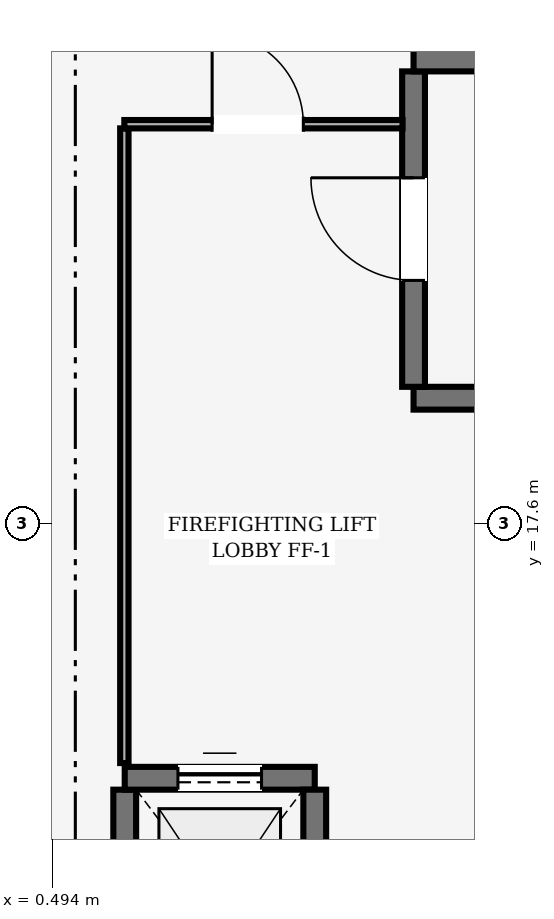
"""IFC4 building model, lengths in metres.
Left out: names, types, materials, properties, quantities, classifications, styles, units other than length and angle.
Written with IfcOpenShell. Run it as: python <this file> out.ifc"""

import sys

from ifc_helpers import new_model, si_unit, direction, frame, frame_2d, origin, place, context, subcontext, project, spatial, rectangle, extrude, element, fill, save


model = new_model("IFC4")
c1 = context("Model", 3, precision=1e-05, world=origin(), true_north=direction((0.0, 1.0)))
c2 = subcontext(c1, "Body", "Model", "MODEL_VIEW")
j1 = project(units=[si_unit("LENGTHUNIT", "METRE"), si_unit("PLANEANGLEUNIT", "RADIAN")], contexts=[c1])
p1 = place(None, origin())
s1 = spatial("IfcSite", under=j1, at=p1, CompositionType="ELEMENT")
p2 = place(p1, origin())
s2 = spatial("IfcBuilding", under=s1, at=p2, CompositionType="ELEMENT")
p3 = place(p2, frame((0.0, 0.0, 19.05)))
s3 = spatial("IfcBuildingStorey", under=s2, at=p3, CompositionType="ELEMENT", Elevation=19.05)
p4 = place(p3, frame((15.43, 19.25, 0.0), z_axis=(0.0, 0.0, 1.0), x_axis=(-1.0, 0.0, 0.0)))
e1 = element("IfcWall", 1, at=p4, inside=s3, PredefinedType="SHEAR", context=c2, shape_type="SweptSolid", body=[
    extrude(rectangle(XDim=10.18, YDim=0.3, at=frame_2d((5.09, 0.0))), origin(), (0.0, 0.0, 1.0), 3.06),
])
p5 = place(p3, frame((5.25, 19.4, 0.0), z_axis=(0.0, 0.0, 1.0), x_axis=(0.0, 1.0, 0.0)))
e2 = element("IfcWall", 2, at=p5, inside=s3, PredefinedType="SHEAR", context=c2, shape_type="SweptSolid", body=[
    extrude(rectangle(XDim=4.15, YDim=0.3, at=frame_2d((2.075, 0.0))), origin(), (0.0, 0.0, 1.0), 3.06),
])
p6 = place(p5, frame((1.4, 0.0, 0.0)))
e3 = element("IfcOpeningElement", 3, at=p6, cuts=e2, PredefinedType="OPENING", context=c2, shape_type="SweptSolid", body=[
    extrude(rectangle(XDim=1.35, YDim=2.2, at=frame_2d((0.675, 1.1))), frame((0.0, 0.15, 0.0), z_axis=(0.0, -1.0, 0.0), x_axis=(1.0, 0.0, 0.0)), (0.0, 0.0, 1.0), 0.3),
])
p7 = place(p3, frame((5.25, 23.7, 0.0), z_axis=(0.0, 0.0, 1.0), x_axis=(1.0, 0.0, 0.0)))
e4 = element("IfcWall", 4, at=p7, inside=s3, PredefinedType="SHEAR", context=c2, shape_type="SweptSolid", body=[
    extrude(rectangle(XDim=10.18, YDim=0.3, at=frame_2d((5.09, 0.0))), origin(), (0.0, 0.0, 1.0), 3.06),
])
p8 = place(p3, frame((1.45, 11.2, 0.0), z_axis=(0.0, 0.0, 1.0), x_axis=(0.0, 1.0, 0.0)))
e5 = element("IfcWall", 5, at=p8, inside=s3, PredefinedType="SHEAR", context=c2, shape_type="SweptSolid", body=[
    extrude(rectangle(XDim=2.9, YDim=0.3, at=frame_2d((1.45, 0.0))), origin(), (0.0, 0.0, 1.0), 3.06),
])
p9 = place(p3, frame((1.45, 14.25, 0.0), z_axis=(0.0, 0.0, 1.0), x_axis=(1.0, 0.0, 0.0)))
e6 = element("IfcWall", 6, at=p9, inside=s3, PredefinedType="SHEAR", context=c2, shape_type="SweptSolid", body=[
    extrude(rectangle(XDim=2.5, YDim=0.3, at=frame_2d((1.25, 0.0))), origin(), (0.0, 0.0, 1.0), 3.06),
])
p10 = place(p9, frame((0.7, 0.0, 0.0)))
e7 = element("IfcOpeningElement", 7, at=p10, cuts=e6, PredefinedType="OPENING", context=c2, shape_type="SweptSolid", body=[
    extrude(rectangle(XDim=1.1, YDim=2.1, at=frame_2d((0.55, 1.05))), frame((0.0, 0.15, 0.0), z_axis=(0.0, -1.0, 0.0), x_axis=(1.0, 0.0, 0.0)), (0.0, 0.0, 1.0), 0.3),
])
p11 = place(p3, frame((3.95, 14.1, 0.0), z_axis=(0.0, 0.0, 1.0), x_axis=(0.0, -1.0, 0.0)))
e8 = element("IfcWall", 8, at=p11, inside=s3, PredefinedType="SHEAR", context=c2, shape_type="SweptSolid", body=[
    extrude(rectangle(XDim=2.9, YDim=0.3, at=frame_2d((1.45, 0.0))), origin(), (0.0, 0.0, 1.0), 3.06),
])
p12 = place(p3, frame((1.445, 14.45, 0.0), z_axis=(0.0, 0.0, 1.0), x_axis=(0.0, 1.0, 0.0)))
e9 = element("IfcWall", 9, at=p12, inside=s3, PredefinedType="PARTITIONING", context=c2, shape_type="SweptSolid", body=[
    extrude(rectangle(XDim=8.35, YDim=0.11, at=frame_2d((4.175, 0.0))), origin(), (0.0, 0.0, 1.0), 3.04),
])
p13 = place(p3, frame((1.445, 22.855, 0.0), z_axis=(0.0, 0.0, 1.0), x_axis=(1.0, 0.0, 0.0)))
e10 = element("IfcWall", 10, at=p13, inside=s3, PredefinedType="PARTITIONING", context=c2, shape_type="SweptSolid", body=[
    extrude(rectangle(XDim=3.66, YDim=0.11, at=frame_2d((1.83, 0.0))), origin(), (0.0, 0.0, 1.0), 3.04),
])
p14 = place(p13, frame((1.155, 0.0, 0.0)))
e11 = element("IfcOpeningElement", 11, at=p14, cuts=e10, PredefinedType="OPENING", context=c2, shape_type="SweptSolid", body=[
    extrude(rectangle(XDim=1.2, YDim=2.15, at=frame_2d((0.6, 1.075))), frame((0.0, 0.055, 0.0), z_axis=(0.0, -1.0, 0.0), x_axis=(1.0, 0.0, 0.0)), (0.0, 0.0, 1.0), 0.11),
])
p15 = place(p6, origin())
e12 = element("IfcDoor", 12, at=p15, inside=s3, OperationType="SINGLE_SWING_RIGHT", PredefinedType="DOOR", context=c2, shape_type="SweptSolid", body=[
    extrude(rectangle(XDim=1.35, YDim=2.2, at=frame_2d((0.675, 1.1))), frame((0.0, 0.025, 0.0), z_axis=(0.0, -1.0, 0.0), x_axis=(1.0, 0.0, 0.0)), (0.0, 0.0, 1.0), 0.05),
])
fill(e3, e12)
p16 = place(p10, origin())
e13 = element("IfcDoor", 13, at=p16, inside=s3, OperationType="SLIDING_TO_LEFT", PredefinedType="DOOR", context=c2, shape_type="SweptSolid", body=[
    extrude(rectangle(XDim=1.1, YDim=2.1, at=frame_2d((0.55, 1.05))), frame((0.0, 0.025, 0.0), z_axis=(0.0, -1.0, 0.0), x_axis=(1.0, 0.0, 0.0)), (0.0, 0.0, 1.0), 0.05),
])
fill(e7, e13)
p17 = place(p14, origin())
e14 = element("IfcDoor", 14, at=p17, inside=s3, OperationType="SINGLE_SWING_LEFT", PredefinedType="DOOR", context=c2, shape_type="SweptSolid", body=[
    extrude(rectangle(XDim=1.2, YDim=2.15, at=frame_2d((0.6, 1.075))), frame((0.0, 0.025, 0.0), z_axis=(0.0, -1.0, 0.0), x_axis=(1.0, 0.0, 0.0)), (0.0, 0.0, 1.0), 0.05),
])
fill(e11, e14)
save(model, sys.argv[1])
